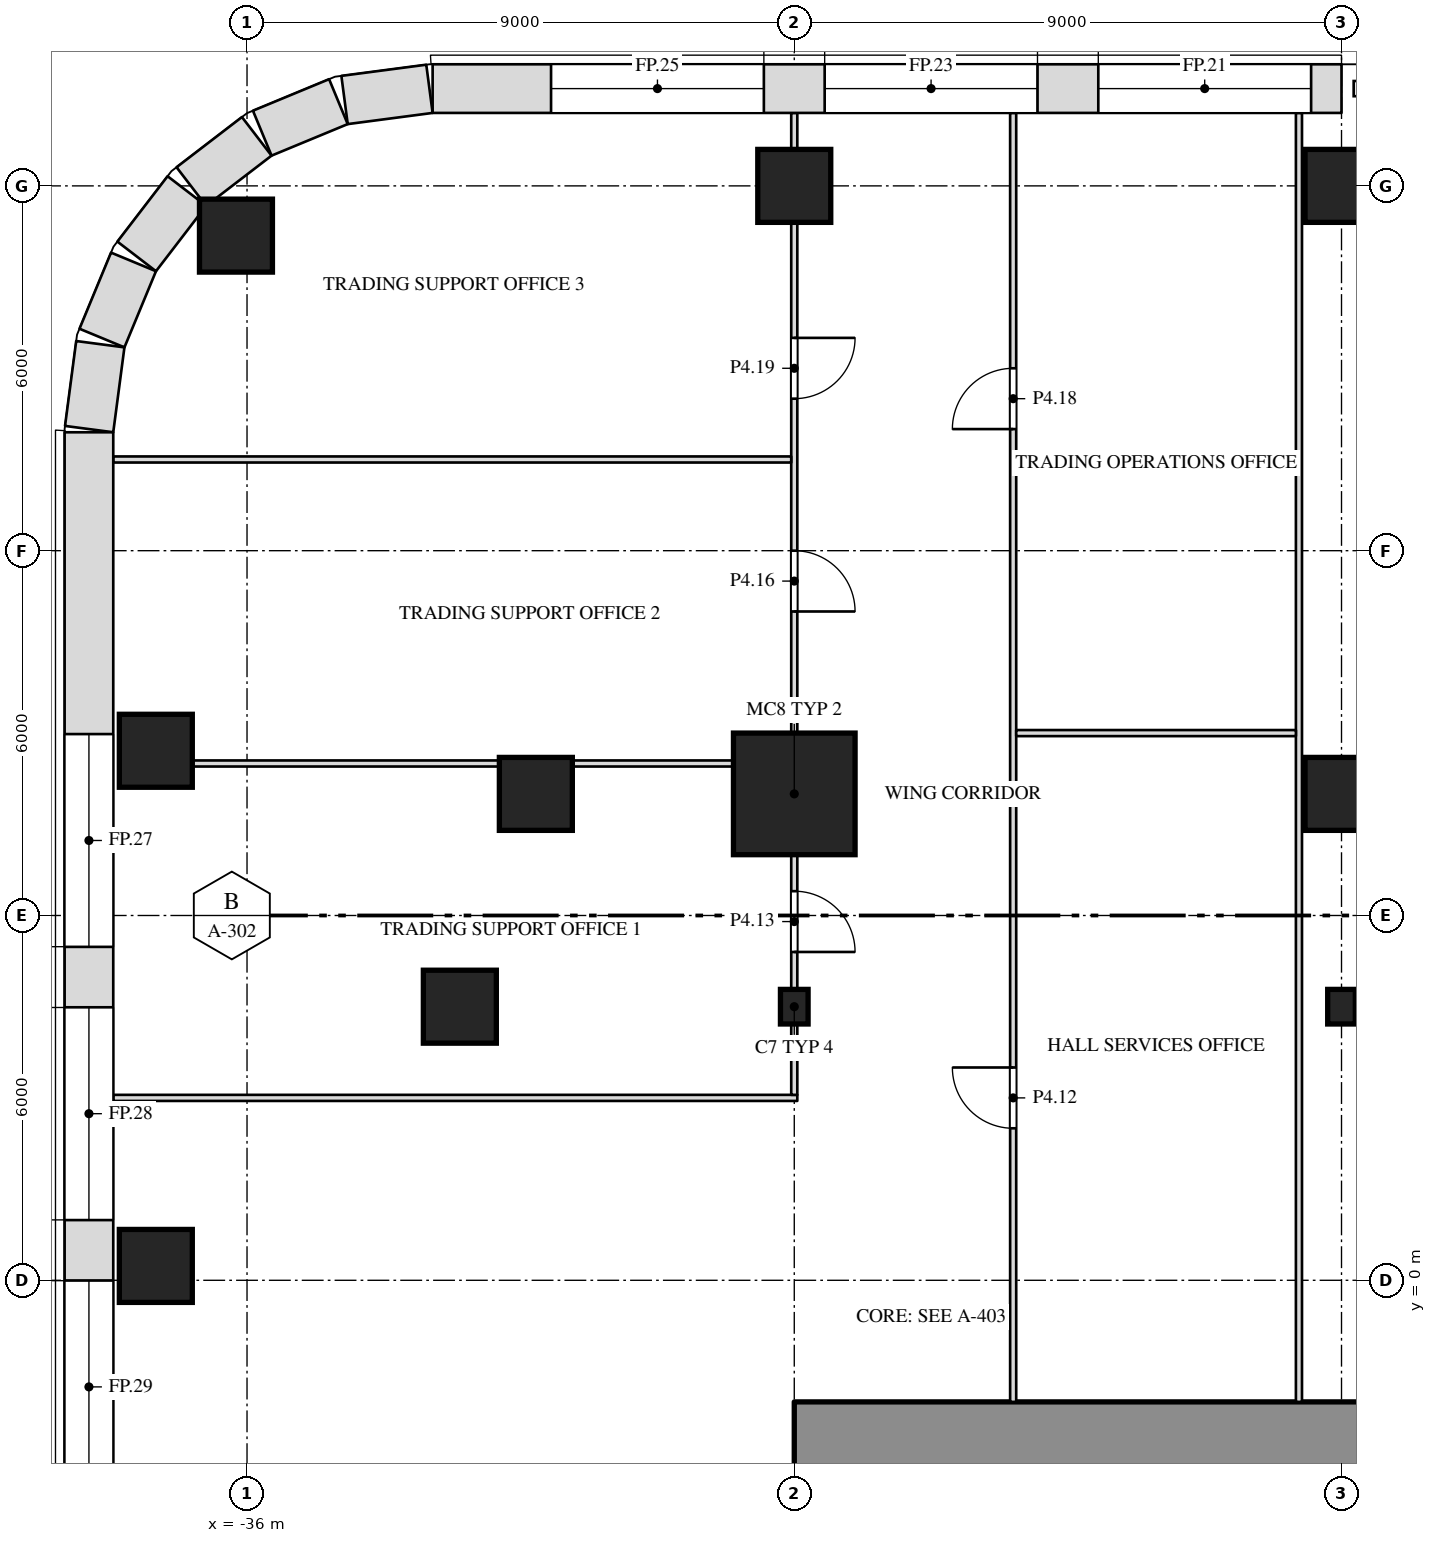
"""IFC4 building model, lengths in metres.
Left out: names, types, materials, properties, quantities, classifications, styles, units other than length and angle.
Written with IfcOpenShell. Run it as: python <this file> out.ifc"""

import sys

from ifc_helpers import new_model, si_unit, direction, frame, frame_2d, origin, origin_2d, place, context, subcontext, project, spatial, rectangle, i_section, extrude, element, fill, save


model = new_model("IFC4")
c1 = context("Model", 3, precision=1e-05, world=origin(), true_north=direction((0.0, 1.0)))
c2 = subcontext(c1, "Body", "Model", "MODEL_VIEW")
j1 = project(units=[si_unit("LENGTHUNIT", "METRE"), si_unit("PLANEANGLEUNIT", "RADIAN")], contexts=[c1])
p1 = place(None, origin())
s1 = spatial("IfcSite", under=j1, at=p1, CompositionType="ELEMENT")
p2 = place(p1, origin())
s2 = spatial("IfcBuilding", under=s1, at=p2, CompositionType="ELEMENT")
p3 = place(p2, frame((0.0, 0.0, 27.0)))
s3 = spatial("IfcBuildingStorey", under=s2, at=p3, CompositionType="ELEMENT", Elevation=27.0)
for number, where, z_axis, x_axis in (
    (1, (-37.5, 0.236, 0.0), (0.0, 0.0, 1.0), (1.0, 0.0, 0.0)),
    (2, (-32.5, 4.5, 0.0), (0.0, 0.0, 1.0), (1.0, 0.0, 0.0)),
):
    element("IfcColumn", number, at=place(p3, frame(where, z_axis=z_axis, x_axis=x_axis)), inside=s3, PredefinedType="COLUMN", context=c2, shape_type="SweptSolid", body=[
        extrude(rectangle(XDim=1.2, YDim=1.2, at=origin_2d()), origin(), (0.0, 0.0, 1.0), 6.0),
    ])
for number, where, z_axis, x_axis in (
    (3, (-27.0, 4.5, 0.0), (0.0, 0.0, 1.0), (1.0, 0.0, 0.0)),
    (4, (-18.0, 4.5, 0.0), (0.0, 0.0, 1.0), (1.0, 0.0, 0.0)),
):
    element("IfcColumn", number, at=place(p3, frame(where, z_axis=z_axis, x_axis=x_axis)), inside=s3, PredefinedType="COLUMN", context=c2, shape_type="SweptSolid", body=[
        extrude(i_section(OverallWidth=0.455, OverallDepth=0.569, WebThickness=0.078, FlangeThickness=0.125, at=origin_2d()), origin(), (0.0, 0.0, 1.0), 6.0),
    ])
p4 = place(p3, frame((-31.25, 8.0, 0.0), z_axis=(0.0, 0.0, 1.0), x_axis=(1.0, 0.0, 0.0)))
e5 = element("IfcColumn", 5, at=p4, inside=s3, PredefinedType="COLUMN", context=c2, shape_type="SweptSolid", body=[
    extrude(rectangle(XDim=1.2, YDim=1.2, at=origin_2d()), origin(), (0.0, 0.0, 1.0), 6.0),
])
p5 = place(p3, frame((-27.0, 8.0, 0.0), z_axis=(0.0, 0.0, 1.0), x_axis=(1.0, 0.0, 0.0)))
e6 = element("IfcColumn", 6, at=p5, inside=s3, PredefinedType="COLUMN", context=c2, shape_type="SweptSolid", body=[
    extrude(rectangle(XDim=2.0, YDim=2.0, at=origin_2d()), origin(), (0.0, 0.0, 1.0), 6.0),
])
for number, where, z_axis, x_axis in (
    (7, (-18.0, 8.0, 0.0), (0.0, 0.0, 1.0), (1.0, 0.0, 0.0)),
    (8, (-37.5, 8.709, 0.0), (0.0, 0.0, 1.0), (1.0, 0.0, 0.0)),
    (9, (-36.182, 17.182, 0.0), (0.0, 0.0, 1.0), (1.0, 0.0, 0.0)),
    (10, (-27.0, 18.0, 0.0), (0.0, 0.0, 1.0), (1.0, 0.0, 0.0)),
    (11, (-18.0, 18.0, 0.0), (0.0, 0.0, 1.0), (1.0, 0.0, 0.0)),
):
    element("IfcColumn", number, at=place(p3, frame(where, z_axis=z_axis, x_axis=x_axis)), inside=s3, PredefinedType="COLUMN", context=c2, shape_type="SweptSolid", body=[
        extrude(rectangle(XDim=1.2, YDim=1.2, at=origin_2d()), origin(), (0.0, 0.0, 1.0), 6.0),
    ])
p6 = place(p3, frame((-27.0, -2.6, 0.0), z_axis=(0.0, 0.0, 1.0), x_axis=(1.0, 0.0, 0.0)))
e12 = element("IfcWall", 12, at=p6, inside=s3, PredefinedType="SHEAR", context=c2, shape_type="SweptSolid", body=[
    extrude(rectangle(XDim=54.0, YDim=1.2, at=frame_2d((27.0, 0.0))), origin(), (0.0, 0.0, 1.0), 5.7),
])
p7 = place(p3, frame((-23.4, -2.0, 0.0), z_axis=(0.0, 0.0, 1.0), x_axis=(0.0, 1.0, 0.0)))
e13 = element("IfcWall", 13, at=p7, inside=s3, PredefinedType="PARTITIONING", context=c2, shape_type="SweptSolid", body=[
    extrude(rectangle(XDim=21.2, YDim=0.1, at=frame_2d((10.6, 0.0))), origin(), (0.0, 0.0, 1.0), 5.7),
])
p8 = place(p7, frame((4.5, 0.0, 0.0)))
e14 = element("IfcOpeningElement", 14, at=p8, cuts=e13, PredefinedType="OPENING", context=c2, shape_type="SweptSolid", body=[
    extrude(rectangle(XDim=1.0, YDim=2.1, at=frame_2d((0.5, 1.05))), frame((0.0, 0.062, 0.0), z_axis=(0.0, -1.0, 0.0), x_axis=(1.0, 0.0, 0.0)), (0.0, 0.0, 1.0), 0.124),
])
p9 = place(p7, frame((16.0, 0.0, 0.0)))
e15 = element("IfcOpeningElement", 15, at=p9, cuts=e13, PredefinedType="OPENING", context=c2, shape_type="SweptSolid", body=[
    extrude(rectangle(XDim=1.0, YDim=2.1, at=frame_2d((0.5, 1.05))), frame((0.0, 0.062, 0.0), z_axis=(0.0, -1.0, 0.0), x_axis=(1.0, 0.0, 0.0)), (0.0, 0.0, 1.0), 0.124),
])
p10 = place(p3, frame((-18.7, -2.0, 0.0), z_axis=(0.0, 0.0, 1.0), x_axis=(0.0, 1.0, 0.0)))
e16 = element("IfcWall", 16, at=p10, inside=s3, PredefinedType="PARTITIONING", context=c2, shape_type="SweptSolid", body=[
    extrude(rectangle(XDim=21.2, YDim=0.1, at=frame_2d((10.6, 0.0))), origin(), (0.0, 0.0, 1.0), 5.7),
])
p11 = place(p3, frame((-38.2, 3.0, 0.0), z_axis=(0.0, 0.0, 1.0), x_axis=(1.0, 0.0, 0.0)))
e17 = element("IfcWall", 17, at=p11, inside=s3, PredefinedType="PARTITIONING", context=c2, shape_type="SweptSolid", body=[
    extrude(rectangle(XDim=11.25, YDim=0.1, at=frame_2d((5.625, 0.0))), origin(), (0.0, 0.0, 1.0), 5.7),
])
p12 = place(p3, frame((-27.0, 3.05, 0.0), z_axis=(0.0, 0.0, 1.0), x_axis=(0.0, 1.0, 0.0)))
e18 = element("IfcWall", 18, at=p12, inside=s3, PredefinedType="PARTITIONING", context=c2, shape_type="SweptSolid", body=[
    extrude(rectangle(XDim=1.166, YDim=0.1, at=frame_2d((0.583, 0.0))), origin(), (0.0, 0.0, 1.0), 5.088),
])
p13 = place(p3, frame((-27.0, 4.784, 0.0), z_axis=(0.0, 0.0, 1.0), x_axis=(0.0, 1.0, 0.0)))
e19 = element("IfcWall", 19, at=p13, inside=s3, PredefinedType="PARTITIONING", context=c2, shape_type="SweptSolid", body=[
    extrude(rectangle(XDim=2.216, YDim=0.1, at=frame_2d((1.108, 0.0))), origin(), (0.0, 0.0, 1.0), 5.088),
])
p14 = place(p13, frame((0.615, 0.0, 0.0)))
e20 = element("IfcOpeningElement", 20, at=p14, cuts=e19, PredefinedType="OPENING", context=c2, shape_type="SweptSolid", body=[
    extrude(rectangle(XDim=1.0, YDim=2.1, at=frame_2d((0.5, 1.05))), frame((0.0, 0.062, 0.0), z_axis=(0.0, -1.0, 0.0), x_axis=(1.0, 0.0, 0.0)), (0.0, 0.0, 1.0), 0.124),
])
p15 = place(p3, frame((-27.0, 9.0, 0.0), z_axis=(0.0, 0.0, 1.0), x_axis=(0.0, 1.0, 0.0)))
e21 = element("IfcWall", 21, at=p15, inside=s3, PredefinedType="PARTITIONING", context=c2, shape_type="SweptSolid", body=[
    extrude(rectangle(XDim=8.4, YDim=0.1, at=frame_2d((4.2, 0.0))), origin(), (0.0, 0.0, 1.0), 5.088),
])
p16 = place(p15, frame((2.0, 0.0, 0.0)))
e22 = element("IfcOpeningElement", 22, at=p16, cuts=e21, PredefinedType="OPENING", context=c2, shape_type="SweptSolid", body=[
    extrude(rectangle(XDim=1.0, YDim=2.1, at=frame_2d((0.5, 1.05))), frame((0.0, 0.062, 0.0), z_axis=(0.0, -1.0, 0.0), x_axis=(1.0, 0.0, 0.0)), (0.0, 0.0, 1.0), 0.124),
])
p17 = place(p15, frame((5.5, 0.0, 0.0)))
e23 = element("IfcOpeningElement", 23, at=p17, cuts=e21, PredefinedType="OPENING", context=c2, shape_type="SweptSolid", body=[
    extrude(rectangle(XDim=1.0, YDim=2.1, at=frame_2d((0.5, 1.05))), frame((0.0, 0.062, 0.0), z_axis=(0.0, -1.0, 0.0), x_axis=(1.0, 0.0, 0.0)), (0.0, 0.0, 1.0), 0.124),
])
p18 = place(p3, frame((-27.0, 18.6, 0.0), z_axis=(0.0, 0.0, 1.0), x_axis=(0.0, 1.0, 0.0)))
e24 = element("IfcWall", 24, at=p18, inside=s3, PredefinedType="PARTITIONING", context=c2, shape_type="SweptSolid", body=[
    extrude(rectangle(XDim=0.6, YDim=0.1, at=frame_2d((0.3, 0.0))), origin(), (0.0, 0.0, 1.0), 5.7),
])
p19 = place(p3, frame((-36.9, 8.5, 0.0), z_axis=(0.0, 0.0, 1.0), x_axis=(1.0, 0.0, 0.0)))
e25 = element("IfcWall", 25, at=p19, inside=s3, PredefinedType="PARTITIONING", context=c2, shape_type="SweptSolid", body=[
    extrude(rectangle(XDim=5.05, YDim=0.1, at=frame_2d((2.525, 0.0))), origin(), (0.0, 0.0, 1.0), 5.7),
])
p20 = place(p3, frame((-30.65, 8.5, 0.0), z_axis=(0.0, 0.0, 1.0), x_axis=(1.0, 0.0, 0.0)))
e26 = element("IfcWall", 26, at=p20, inside=s3, PredefinedType="PARTITIONING", context=c2, shape_type="SweptSolid", body=[
    extrude(rectangle(XDim=2.65, YDim=0.1, at=frame_2d((1.325, 0.0))), origin(), (0.0, 0.0, 1.0), 5.7),
])
p21 = place(p3, frame((-23.35, 9.0, 0.0), z_axis=(0.0, 0.0, 1.0), x_axis=(1.0, 0.0, 0.0)))
e27 = element("IfcWall", 27, at=p21, inside=s3, PredefinedType="PARTITIONING", context=c2, shape_type="SweptSolid", body=[
    extrude(rectangle(XDim=4.6, YDim=0.1, at=frame_2d((2.3, 0.0))), origin(), (0.0, 0.0, 1.0), 5.7),
])
p22 = place(p3, frame((-38.2, 13.5, 0.0), z_axis=(0.0, 0.0, 1.0), x_axis=(1.0, 0.0, 0.0)))
e28 = element("IfcWall", 28, at=p22, inside=s3, PredefinedType="PARTITIONING", context=c2, shape_type="SweptSolid", body=[
    extrude(rectangle(XDim=11.15, YDim=0.1, at=frame_2d((5.575, 0.0))), origin(), (0.0, 0.0, 1.0), 5.7),
])
p23 = place(p3, frame((-18.0, 19.6, 0.0), z_axis=(0.0, 0.0, 1.0), x_axis=(-1.0, 0.0, 0.0)))
e29 = element("IfcWall", 29, at=p23, inside=s3, PredefinedType="SOLIDWALL", context=c2, shape_type="SweptSolid", body=[
    extrude(rectangle(XDim=14.948, YDim=0.8, at=frame_2d((7.474, 0.0))), origin(), (0.0, 0.0, 1.0), 5.7),
])
p24 = place(p23, frame((0.5, 0.0, 1.0)))
e30 = element("IfcOpeningElement", 30, at=p24, cuts=e29, PredefinedType="OPENING", context=c2, shape_type="SweptSolid", body=[
    extrude(rectangle(XDim=3.5, YDim=4.0, at=frame_2d((1.75, 2.0))), frame((0.0, 0.412, 0.0), z_axis=(0.0, -1.0, 0.0), x_axis=(1.0, 0.0, 0.0)), (0.0, 0.0, 1.0), 0.824),
])
p25 = place(p23, frame((5.0, 0.0, 1.0)))
e31 = element("IfcOpeningElement", 31, at=p25, cuts=e29, PredefinedType="OPENING", context=c2, shape_type="SweptSolid", body=[
    extrude(rectangle(XDim=3.5, YDim=4.0, at=frame_2d((1.75, 2.0))), frame((0.0, 0.412, 0.0), z_axis=(0.0, -1.0, 0.0), x_axis=(1.0, 0.0, 0.0)), (0.0, 0.0, 1.0), 0.824),
])
p26 = place(p23, frame((9.5, 0.0, 1.0)))
e32 = element("IfcOpeningElement", 32, at=p26, cuts=e29, PredefinedType="OPENING", context=c2, shape_type="SweptSolid", body=[
    extrude(rectangle(XDim=3.5, YDim=4.0, at=frame_2d((1.75, 2.0))), frame((0.0, 0.412, 0.0), z_axis=(0.0, -1.0, 0.0), x_axis=(1.0, 0.0, 0.0)), (0.0, 0.0, 1.0), 0.824),
])
p27 = place(p3, frame((-33.0, 19.597, 0.0), z_axis=(0.0, 0.0, 1.0), x_axis=(-0.99144603414, -0.130517283865, 0.0)))
e33 = element("IfcWall", 33, at=p27, inside=s3, PredefinedType="SOLIDWALL", context=c2, shape_type="SweptSolid", body=[
    extrude(rectangle(XDim=1.408, YDim=0.8, at=frame_2d((0.704, 0.0))), origin(), (0.0, 0.0, 1.0), 5.7),
])
p28 = place(p3, frame((-34.497, 19.386, 0.0), z_axis=(0.0, 0.0, 1.0), x_axis=(-0.923847774587, -0.38276009378, 0.0)))
e34 = element("IfcWall", 34, at=p28, inside=s3, PredefinedType="SOLIDWALL", context=c2, shape_type="SweptSolid", body=[
    extrude(rectangle(XDim=1.355, YDim=0.8, at=frame_2d((0.678, 0.0))), origin(), (0.0, 0.0, 1.0), 5.7),
])
for number, where, z_axis, x_axis in (
    (35, (-35.84, 18.815, 0.0), (0.0, 0.0, 1.0), (-0.793, -0.609, 0.0)),
    (36, (-36.989, 17.916, 0.0), (0.0, 0.0, 1.0), (-0.609, -0.793, 0.0)),
):
    element("IfcWall", number, at=place(p3, frame(where, z_axis=z_axis, x_axis=x_axis)), inside=s3, PredefinedType="SOLIDWALL", context=c2, shape_type="SweptSolid", body=[
        extrude(rectangle(XDim=1.356, YDim=0.8, at=frame_2d((0.678, 0.0))), origin(), (0.0, 0.0, 1.0), 5.7),
    ])
p29 = place(p3, frame((-37.867, 16.75, 0.0), z_axis=(0.0, 0.0, 1.0), x_axis=(-0.38276009378, -0.923847774587, 0.0)))
e37 = element("IfcWall", 37, at=p29, inside=s3, PredefinedType="SOLIDWALL", context=c2, shape_type="SweptSolid", body=[
    extrude(rectangle(XDim=1.355, YDim=0.8, at=frame_2d((0.678, 0.0))), origin(), (0.0, 0.0, 1.0), 5.7),
])
p30 = place(p3, frame((-38.413, 15.396, 0.0), z_axis=(0.0, 0.0, 1.0), x_axis=(-0.130517283865, -0.99144603414, 0.0)))
e38 = element("IfcWall", 38, at=p30, inside=s3, PredefinedType="SOLIDWALL", context=c2, shape_type="SweptSolid", body=[
    extrude(rectangle(XDim=1.408, YDim=0.8, at=frame_2d((0.704, 0.0))), origin(), (0.0, 0.0, 1.0), 5.7),
])
p31 = place(p3, frame((-38.6, 13.948, 0.0), z_axis=(0.0, 0.0, 1.0), x_axis=(0.0, -1.0, 0.0)))
e39 = element("IfcWall", 39, at=p31, inside=s3, PredefinedType="SOLIDWALL", context=c2, shape_type="SweptSolid", body=[
    extrude(rectangle(XDim=35.895, YDim=0.8, at=frame_2d((17.948, 0.0))), origin(), (0.0, 0.0, 1.0), 5.7),
])
p32 = place(p31, frame((4.964, 0.0, 1.0)))
e40 = element("IfcOpeningElement", 40, at=p32, cuts=e39, PredefinedType="OPENING", context=c2, shape_type="SweptSolid", body=[
    extrude(rectangle(XDim=3.5, YDim=4.0, at=frame_2d((1.75, 2.0))), frame((0.0, 0.412, 0.0), z_axis=(0.0, -1.0, 0.0), x_axis=(1.0, 0.0, 0.0)), (0.0, 0.0, 1.0), 0.824),
])
p33 = place(p31, frame((9.458, 0.0, 1.0)))
e41 = element("IfcOpeningElement", 41, at=p33, cuts=e39, PredefinedType="OPENING", context=c2, shape_type="SweptSolid", body=[
    extrude(rectangle(XDim=3.5, YDim=4.0, at=frame_2d((1.75, 2.0))), frame((0.0, 0.412, 0.0), z_axis=(0.0, -1.0, 0.0), x_axis=(1.0, 0.0, 0.0)), (0.0, 0.0, 1.0), 0.824),
])
p34 = place(p31, frame((13.951, 0.0, 1.0)))
e42 = element("IfcOpeningElement", 42, at=p34, cuts=e39, PredefinedType="OPENING", context=c2, shape_type="SweptSolid", body=[
    extrude(rectangle(XDim=3.5, YDim=4.0, at=frame_2d((1.75, 2.0))), frame((0.0, 0.412, 0.0), z_axis=(0.0, -1.0, 0.0), x_axis=(1.0, 0.0, 0.0)), (0.0, 0.0, 1.0), 0.824),
])
p35 = place(p31, frame((18.444, 0.0, 1.0)))
e43 = element("IfcOpeningElement", 43, at=p35, cuts=e39, PredefinedType="OPENING", context=c2, shape_type="SweptSolid", body=[
    extrude(rectangle(XDim=3.5, YDim=4.0, at=frame_2d((1.75, 2.0))), frame((0.0, 0.412, 0.0), z_axis=(0.0, -1.0, 0.0), x_axis=(1.0, 0.0, 0.0)), (0.0, 0.0, 1.0), 0.824),
])
p36 = place(p31, frame((22.938, 0.0, 1.0)))
e44 = element("IfcOpeningElement", 44, at=p36, cuts=e39, PredefinedType="OPENING", context=c2, shape_type="SweptSolid", body=[
    extrude(rectangle(XDim=3.5, YDim=4.0, at=frame_2d((1.75, 2.0))), frame((0.0, 0.412, 0.0), z_axis=(0.0, -1.0, 0.0), x_axis=(1.0, 0.0, 0.0)), (0.0, 0.0, 1.0), 0.824),
])
p37 = place(p31, frame((27.431, 0.0, 1.0)))
e45 = element("IfcOpeningElement", 45, at=p37, cuts=e39, PredefinedType="OPENING", context=c2, shape_type="SweptSolid", body=[
    extrude(rectangle(XDim=3.5, YDim=4.0, at=frame_2d((1.75, 2.0))), frame((0.0, 0.412, 0.0), z_axis=(0.0, -1.0, 0.0), x_axis=(1.0, 0.0, 0.0)), (0.0, 0.0, 1.0), 0.824),
])
p38 = place(p8, origin())
e46 = element("IfcDoor", 46, at=p38, inside=s3, OperationType="SINGLE_SWING_RIGHT", PredefinedType="DOOR", context=c2, shape_type="SweptSolid", body=[
    extrude(rectangle(XDim=1.0, YDim=2.1, at=frame_2d((0.5, 1.05))), frame((0.0, 0.025, 0.0), z_axis=(0.0, -1.0, 0.0), x_axis=(1.0, 0.0, 0.0)), (0.0, 0.0, 1.0), 0.05),
])
fill(e14, e46)
p39 = place(p14, origin())
e47 = element("IfcDoor", 47, at=p39, inside=s3, OperationType="SINGLE_SWING_RIGHT", PredefinedType="DOOR", context=c2, shape_type="SweptSolid", body=[
    extrude(rectangle(XDim=1.0, YDim=2.1, at=frame_2d((0.5, 1.05))), frame((0.0, 0.025, 0.0), z_axis=(0.0, -1.0, 0.0), x_axis=(1.0, 0.0, 0.0)), (0.0, 0.0, 1.0), 0.05),
])
fill(e20, e47)
p40 = place(p16, origin())
e48 = element("IfcDoor", 48, at=p40, inside=s3, OperationType="SINGLE_SWING_RIGHT", PredefinedType="DOOR", context=c2, shape_type="SweptSolid", body=[
    extrude(rectangle(XDim=1.0, YDim=2.1, at=frame_2d((0.5, 1.05))), frame((0.0, 0.025, 0.0), z_axis=(0.0, -1.0, 0.0), x_axis=(1.0, 0.0, 0.0)), (0.0, 0.0, 1.0), 0.05),
])
fill(e22, e48)
p41 = place(p9, origin())
e49 = element("IfcDoor", 49, at=p41, inside=s3, OperationType="SINGLE_SWING_LEFT", PredefinedType="DOOR", context=c2, shape_type="SweptSolid", body=[
    extrude(rectangle(XDim=1.0, YDim=2.1, at=frame_2d((0.5, 1.05))), frame((0.0, 0.025, 0.0), z_axis=(0.0, -1.0, 0.0), x_axis=(1.0, 0.0, 0.0)), (0.0, 0.0, 1.0), 0.05),
])
fill(e15, e49)
p42 = place(p17, origin())
e50 = element("IfcDoor", 50, at=p42, inside=s3, OperationType="SINGLE_SWING_LEFT", PredefinedType="DOOR", context=c2, shape_type="SweptSolid", body=[
    extrude(rectangle(XDim=1.0, YDim=2.1, at=frame_2d((0.5, 1.05))), frame((0.0, 0.025, 0.0), z_axis=(0.0, -1.0, 0.0), x_axis=(1.0, 0.0, 0.0)), (0.0, 0.0, 1.0), 0.05),
])
fill(e23, e50)
p43 = place(p24, origin())
e51 = element("IfcWindow", 51, at=p43, inside=s3, PartitioningType="SINGLE_PANEL", PredefinedType="WINDOW", context=c2, shape_type="SweptSolid", body=[
    extrude(rectangle(XDim=3.5, YDim=4.0, at=frame_2d((1.75, 2.0))), frame((0.0, 0.03, 0.0), z_axis=(0.0, -1.0, 0.0), x_axis=(1.0, 0.0, 0.0)), (0.0, 0.0, 1.0), 0.06),
])
fill(e30, e51)
p44 = place(p25, origin())
e52 = element("IfcWindow", 52, at=p44, inside=s3, PartitioningType="SINGLE_PANEL", PredefinedType="WINDOW", context=c2, shape_type="SweptSolid", body=[
    extrude(rectangle(XDim=3.5, YDim=4.0, at=frame_2d((1.75, 2.0))), frame((0.0, 0.03, 0.0), z_axis=(0.0, -1.0, 0.0), x_axis=(1.0, 0.0, 0.0)), (0.0, 0.0, 1.0), 0.06),
])
fill(e31, e52)
p45 = place(p26, origin())
e53 = element("IfcWindow", 53, at=p45, inside=s3, PartitioningType="SINGLE_PANEL", PredefinedType="WINDOW", context=c2, shape_type="SweptSolid", body=[
    extrude(rectangle(XDim=3.5, YDim=4.0, at=frame_2d((1.75, 2.0))), frame((0.0, 0.03, 0.0), z_axis=(0.0, -1.0, 0.0), x_axis=(1.0, 0.0, 0.0)), (0.0, 0.0, 1.0), 0.06),
])
fill(e32, e53)
p46 = place(p32, origin())
e54 = element("IfcWindow", 54, at=p46, inside=s3, PartitioningType="SINGLE_PANEL", PredefinedType="WINDOW", context=c2, shape_type="SweptSolid", body=[
    extrude(rectangle(XDim=3.5, YDim=4.0, at=frame_2d((1.75, 2.0))), frame((0.0, 0.03, 0.0), z_axis=(0.0, -1.0, 0.0), x_axis=(1.0, 0.0, 0.0)), (0.0, 0.0, 1.0), 0.06),
])
fill(e40, e54)
p47 = place(p33, origin())
e55 = element("IfcWindow", 55, at=p47, inside=s3, PartitioningType="SINGLE_PANEL", PredefinedType="WINDOW", context=c2, shape_type="SweptSolid", body=[
    extrude(rectangle(XDim=3.5, YDim=4.0, at=frame_2d((1.75, 2.0))), frame((0.0, 0.03, 0.0), z_axis=(0.0, -1.0, 0.0), x_axis=(1.0, 0.0, 0.0)), (0.0, 0.0, 1.0), 0.06),
])
fill(e41, e55)
p48 = place(p34, origin())
e56 = element("IfcWindow", 56, at=p48, inside=s3, PartitioningType="SINGLE_PANEL", PredefinedType="WINDOW", context=c2, shape_type="SweptSolid", body=[
    extrude(rectangle(XDim=3.5, YDim=4.0, at=frame_2d((1.75, 2.0))), frame((0.0, 0.03, 0.0), z_axis=(0.0, -1.0, 0.0), x_axis=(1.0, 0.0, 0.0)), (0.0, 0.0, 1.0), 0.06),
])
fill(e42, e56)
save(model, sys.argv[1])
